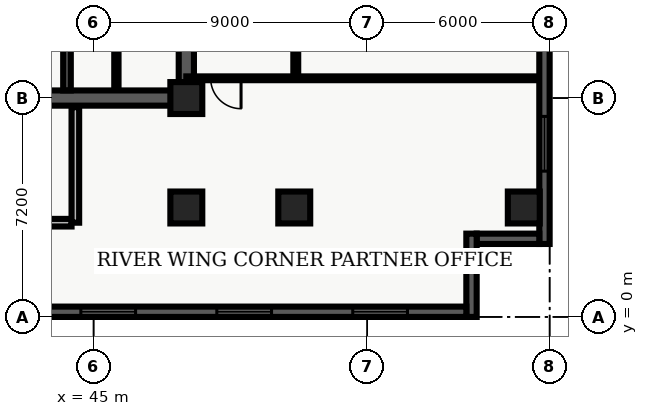
"""IFC4 building model, lengths in metres.
Left out: names, types, materials, properties, quantities, classifications, styles, units other than length and angle.
Written with IfcOpenShell. Run it as: python <this file> out.ifc"""

import sys

from ifc_helpers import new_model, entity, si_unit, converted_unit, direction, frame, origin_with_axes, origin_2d_with_axis, place, context, subcontext, project, spatial, polyline, rectangle, outline, extrude, element, fill, save


model = new_model("IFC4")
c1 = context("Model", 3, precision=1e-05, world=origin_with_axes(), true_north=direction((0.0, 1.0)))
c2 = subcontext(c1, "Body", "Model", "MODEL_VIEW")
j1 = project(units=[si_unit("LENGTHUNIT", "METRE"), converted_unit("PLANEANGLEUNIT", "DEGREE", entity("IfcPlaneAngleMeasure", 0.017), si_unit("PLANEANGLEUNIT", "RADIAN"), dimensions=[0, 0, 0, 0, 0, 0, 0])], contexts=[c1])
p1 = place(None, origin_with_axes())
s1 = spatial("IfcSite", under=j1, at=p1, CompositionType="ELEMENT")
p2 = place(p1, origin_with_axes())
s2 = spatial("IfcBuilding", under=s1, at=p2, CompositionType="ELEMENT")
p3 = place(p2, frame((0.0, 0.0, 156.3), z_axis=(0.0, 0.0, 1.0), x_axis=(1.0, 0.0, 0.0)))
s3 = spatial("IfcBuildingStorey", under=s2, at=p3, CompositionType="ELEMENT", Elevation=156.3)
p4 = place(p3, frame((40.2, 7.2, 0.0), z_axis=(0.0, 0.0, 1.0), x_axis=(1.0, 0.0, 0.0)))
e1 = element("IfcWall", 1, at=p4, inside=s3, PredefinedType="SHEAR", context=c2, shape_type="SweptSolid", body=[
    extrude(outline(polyline([(0.0, -0.25), (7.85, -0.25), (7.85, 0.25), (0.0, 0.25), (0.0, -0.25)])), origin_with_axes(), (0.0, 0.0, 1.0), 3.66),
])
p5 = place(p4, frame((2.175, 0.0, 0.0), z_axis=(0.0, 0.0, 1.0), x_axis=(1.0, 0.0, 0.0)))
e2 = element("IfcOpeningElement", 2, at=p5, cuts=e1, PredefinedType="OPENING", context=c2, shape_type="SweptSolid", body=[
    extrude(rectangle(XDim=1.05, YDim=0.52, at=origin_2d_with_axis()), origin_with_axes(), (0.0, 0.0, 1.0), 2.15),
])
p6 = place(p3, frame((48.05, 7.2, 0.0), z_axis=(0.0, 0.0, 1.0), x_axis=(0.0, 1.0, 0.0)))
e3 = element("IfcWall", 3, at=p6, inside=s3, PredefinedType="SHEAR", context=c2, shape_type="SweptSolid", body=[
    extrude(outline(polyline([(0.0, -0.25), (15.6, -0.25), (15.6, 0.25), (0.0, 0.25), (0.0, -0.25)])), origin_with_axes(), (0.0, 0.0, 1.0), 3.66),
])
p7 = place(p6, frame((5.975, 0.0, 0.0), z_axis=(0.0, 0.0, 1.0), x_axis=(1.0, 0.0, 0.0)))
e4 = element("IfcOpeningElement", 4, at=p7, cuts=e3, PredefinedType="OPENING", context=c2, shape_type="SweptSolid", body=[
    extrude(rectangle(XDim=1.05, YDim=0.52, at=origin_2d_with_axis()), origin_with_axes(), (0.0, 0.0, 1.0), 2.15),
])
p8 = place(p6, frame((2.725, 0.0, 0.0), z_axis=(0.0, 0.0, 1.0), x_axis=(1.0, 0.0, 0.0)))
e5 = element("IfcOpeningElement", 5, at=p8, cuts=e3, PredefinedType="OPENING", context=c2, shape_type="SweptSolid", body=[
    extrude(rectangle(XDim=0.95, YDim=0.52, at=origin_2d_with_axis()), origin_with_axes(), (0.0, 0.0, 1.0), 2.15),
])
p9 = place(p3, frame((44.125, 7.45, 0.0), z_axis=(0.0, 0.0, 1.0), x_axis=(0.0, 1.0, 0.0)))
e6 = element("IfcWall", 6, at=p9, inside=s3, PredefinedType="SHEAR", context=c2, shape_type="SweptSolid", body=[
    extrude(outline(polyline([(0.0, -0.125), (15.1, -0.125), (15.1, 0.125), (0.0, 0.125), (0.0, -0.125)])), origin_with_axes(), (0.0, 0.0, 1.0), 3.66),
])
p10 = place(p3, frame((40.325, 3.1, 0.0), z_axis=(0.0, 0.0, 1.0), x_axis=(1.0, 0.0, 0.0)))
e7 = element("IfcWall", 7, at=p10, inside=s3, PredefinedType="SOLIDWALL", context=c2, shape_type="SweptSolid", body=[
    extrude(outline(polyline([(0.0, -0.125), (3.95, -0.125), (3.95, 0.125), (0.0, 0.125), (0.0, -0.125)])), origin_with_axes(), (0.0, 0.0, 1.0), 2.7),
])
p11 = place(p3, frame((44.4, 3.1, 0.0), z_axis=(0.0, 0.0, 1.0), x_axis=(0.0, 1.0, 0.0)))
e8 = element("IfcWall", 8, at=p11, inside=s3, PredefinedType="SOLIDWALL", context=c2, shape_type="SweptSolid", body=[
    extrude(outline(polyline([(0.0, -0.125), (3.8, -0.125), (3.8, 0.125), (0.0, 0.125), (0.0, -0.125)])), origin_with_axes(), (0.0, 0.0, 1.0), 2.7),
])
for number, where, z_axis, x_axis in (
    (9, (48.05, 3.6, 0.0), (0.0, 0.0, 1.0), (1.0, 0.0, 0.0)),
    (10, (48.05, 7.2, 0.0), (0.0, 0.0, 1.0), (1.0, 0.0, 0.0)),
    (11, (51.6, 3.6, 0.0), (0.0, 0.0, 1.0), (1.0, 0.0, 0.0)),
    (12, (59.15, 3.6, 0.0), (0.0, 0.0, 1.0), (1.0, 0.0, 0.0)),
):
    element("IfcColumn", number, at=place(p3, frame(where, z_axis=z_axis, x_axis=x_axis)), inside=s3, PredefinedType="COLUMN", context=c2, shape_type="SweptSolid", body=[
        extrude(rectangle(XDim=1.05, YDim=1.05, at=origin_2d_with_axis()), origin_with_axes(), (0.0, 0.0, 1.0), 3.9),
    ])
p12 = place(p3, frame((45.75, 7.5, 0.0), z_axis=(0.0, 0.0, 1.0), x_axis=(0.0, 1.0, 0.0)))
e13 = element("IfcWall", 13, at=p12, inside=s3, PredefinedType="PARTITIONING", context=c2, shape_type="SweptSolid", body=[
    extrude(outline(polyline([(0.0, -0.07), (4.08, -0.07), (4.08, 0.07), (0.0, 0.07), (0.0, -0.07)])), origin_with_axes(), (0.0, 0.0, 1.0), 2.7),
])
p13 = place(p12, frame((2.0, 0.0, 0.0), z_axis=(0.0, 0.0, 1.0), x_axis=(1.0, 0.0, 0.0)))
e14 = element("IfcOpeningElement", 14, at=p13, cuts=e13, PredefinedType="OPENING", context=c2, shape_type="SweptSolid", body=[
    extrude(rectangle(XDim=0.9, YDim=0.16, at=origin_2d_with_axis()), origin_with_axes(), (0.0, 0.0, 1.0), 2.15),
])
p14 = place(p3, frame((51.65, 7.85, 0.0), z_axis=(0.0, 0.0, 1.0), x_axis=(0.0, 1.0, 0.0)))
e15 = element("IfcWall", 15, at=p14, inside=s3, PredefinedType="PARTITIONING", context=c2, shape_type="SweptSolid", body=[
    extrude(outline(polyline([(0.0, -0.08), (18.8, -0.08), (18.8, 0.08), (0.0, 0.08), (0.0, -0.08)])), origin_with_axes(), (0.0, 0.0, 1.0), 2.7),
])
p15 = place(p14, frame((4.559, 0.0, 0.0), z_axis=(0.0, 0.0, 1.0), x_axis=(1.0, 0.0, 0.0)))
e16 = element("IfcOpeningElement", 16, at=p15, cuts=e15, PredefinedType="OPENING", context=c2, shape_type="SweptSolid", body=[
    extrude(rectangle(XDim=1.0, YDim=0.18, at=origin_2d_with_axis()), origin_with_axes(), (0.0, 0.0, 1.0), 2.15),
])
p16 = place(p14, frame((11.523, 0.0, 0.0), z_axis=(0.0, 0.0, 1.0), x_axis=(1.0, 0.0, 0.0)))
e17 = element("IfcOpeningElement", 17, at=p16, cuts=e15, PredefinedType="OPENING", context=c2, shape_type="SweptSolid", body=[
    extrude(rectangle(XDim=1.0, YDim=0.18, at=origin_2d_with_axis()), origin_with_axes(), (0.0, 0.0, 1.0), 2.15),
])
p17 = place(p14, frame((17.733, 0.0, 0.0), z_axis=(0.0, 0.0, 1.0), x_axis=(1.0, 0.0, 0.0)))
e18 = element("IfcOpeningElement", 18, at=p17, cuts=e15, PredefinedType="OPENING", context=c2, shape_type="SweptSolid", body=[
    extrude(rectangle(XDim=1.0, YDim=0.18, at=origin_2d_with_axis()), origin_with_axes(), (0.0, 0.0, 1.0), 2.15),
])
p18 = place(p3, frame((59.665, 7.85, 0.0), z_axis=(0.0, 0.0, 1.0), x_axis=(-1.0, 0.0, 0.0)))
e19 = element("IfcWall", 19, at=p18, inside=s3, PredefinedType="PARTITIONING", context=c2, shape_type="SweptSolid", body=[
    extrude(outline(polyline([(0.0, -0.062), (11.615, -0.062), (11.615, 0.062), (0.0, 0.062), (0.0, -0.062)])), origin_with_axes(), (0.0, 0.0, 1.0), 2.7),
])
p19 = place(p18, frame((10.315, 0.0, 0.0), z_axis=(0.0, 0.0, 1.0), x_axis=(1.0, 0.0, 0.0)))
e20 = element("IfcOpeningElement", 20, at=p19, cuts=e19, PredefinedType="OPENING", context=c2, shape_type="SweptSolid", body=[
    extrude(rectangle(XDim=1.0, YDim=0.145, at=origin_2d_with_axis()), origin_with_axes(), (0.0, 0.0, 1.0), 2.15),
])
p20 = place(p3, frame((59.83, 26.06, 0.0), z_axis=(0.0, 0.0, 1.0), x_axis=(0.0, -1.0, 0.0)))
e21 = element("IfcWall", 21, at=p20, inside=s3, PredefinedType="SOLIDWALL", context=c2, shape_type="SweptSolid", body=[
    extrude(outline(polyline([(0.0, -0.17), (23.66, -0.17), (23.66, 0.17), (0.0, 0.17), (0.0, -0.17)])), origin_with_axes(), (0.0, 0.0, 1.0), 3.66),
])
p21 = place(p20, frame((11.83, 0.0, 0.45), z_axis=(0.0, 0.0, 1.0), x_axis=(1.0, 0.0, 0.0)))
e22 = element("IfcOpeningElement", 22, at=p21, cuts=e21, PredefinedType="OPENING", context=c2, shape_type="SweptSolid", body=[
    extrude(rectangle(XDim=1.8, YDim=0.36, at=origin_2d_with_axis()), origin_with_axes(), (0.0, 0.0, 1.0), 2.1),
])
p22 = place(p20, frame((20.364, 0.0, 0.45), z_axis=(0.0, 0.0, 1.0), x_axis=(1.0, 0.0, 0.0)))
e23 = element("IfcOpeningElement", 23, at=p22, cuts=e21, PredefinedType="OPENING", context=c2, shape_type="SweptSolid", body=[
    extrude(rectangle(XDim=1.8, YDim=0.36, at=origin_2d_with_axis()), origin_with_axes(), (0.0, 0.0, 1.0), 2.1),
])
p23 = place(p3, frame((59.66, 2.57, 0.0), z_axis=(0.0, 0.0, 1.0), x_axis=(-1.0, 0.0, 0.0)))
e24 = element("IfcWall", 24, at=p23, inside=s3, PredefinedType="SOLIDWALL", context=c2, shape_type="SweptSolid", body=[
    extrude(outline(polyline([(0.0, -0.17), (2.06, -0.17), (2.06, 0.17), (0.0, 0.17), (0.0, -0.17)])), origin_with_axes(), (0.0, 0.0, 1.0), 3.66),
])
p24 = place(p3, frame((57.43, 2.74, 0.0), z_axis=(0.0, 0.0, 1.0), x_axis=(0.0, -1.0, 0.0)))
e25 = element("IfcWall", 25, at=p24, inside=s3, PredefinedType="SOLIDWALL", context=c2, shape_type="SweptSolid", body=[
    extrude(outline(polyline([(0.0, -0.17), (2.74, -0.17), (2.74, 0.17), (0.0, 0.17), (0.0, -0.17)])), origin_with_axes(), (0.0, 0.0, 1.0), 3.66),
])
p25 = place(p3, frame((57.26, 0.17, 0.0), z_axis=(0.0, 0.0, 1.0), x_axis=(-1.0, 0.0, 0.0)))
e26 = element("IfcWall", 26, at=p25, inside=s3, PredefinedType="SOLIDWALL", context=c2, shape_type="SweptSolid", body=[
    extrude(outline(polyline([(0.0, -0.17), (54.86, -0.17), (54.86, 0.17), (0.0, 0.17), (0.0, -0.17)])), origin_with_axes(), (0.0, 0.0, 1.0), 3.66),
])
p26 = place(p25, frame((2.836, 0.0, 0.45), z_axis=(0.0, 0.0, 1.0), x_axis=(1.0, 0.0, 0.0)))
e27 = element("IfcOpeningElement", 27, at=p26, cuts=e26, PredefinedType="OPENING", context=c2, shape_type="SweptSolid", body=[
    extrude(rectangle(XDim=1.8, YDim=0.36, at=origin_2d_with_axis()), origin_with_axes(), (0.0, 0.0, 1.0), 2.1),
])
p27 = place(p25, frame((7.307, 0.0, 0.45), z_axis=(0.0, 0.0, 1.0), x_axis=(1.0, 0.0, 0.0)))
e28 = element("IfcOpeningElement", 28, at=p27, cuts=e26, PredefinedType="OPENING", context=c2, shape_type="SweptSolid", body=[
    extrude(rectangle(XDim=1.8, YDim=0.36, at=origin_2d_with_axis()), origin_with_axes(), (0.0, 0.0, 1.0), 2.1),
])
p28 = place(p25, frame((11.779, 0.0, 0.45), z_axis=(0.0, 0.0, 1.0), x_axis=(1.0, 0.0, 0.0)))
e29 = element("IfcOpeningElement", 29, at=p28, cuts=e26, PredefinedType="OPENING", context=c2, shape_type="SweptSolid", body=[
    extrude(rectangle(XDim=1.8, YDim=0.36, at=origin_2d_with_axis()), origin_with_axes(), (0.0, 0.0, 1.0), 2.1),
])
p29 = place(p25, frame((16.251, 0.0, 0.45), z_axis=(0.0, 0.0, 1.0), x_axis=(1.0, 0.0, 0.0)))
e30 = element("IfcOpeningElement", 30, at=p29, cuts=e26, PredefinedType="OPENING", context=c2, shape_type="SweptSolid", body=[
    extrude(rectangle(XDim=1.8, YDim=0.36, at=origin_2d_with_axis()), origin_with_axes(), (0.0, 0.0, 1.0), 2.1),
])
p30 = place(p25, frame((20.723, 0.0, 0.45), z_axis=(0.0, 0.0, 1.0), x_axis=(1.0, 0.0, 0.0)))
e31 = element("IfcOpeningElement", 31, at=p30, cuts=e26, PredefinedType="OPENING", context=c2, shape_type="SweptSolid", body=[
    extrude(rectangle(XDim=1.8, YDim=0.36, at=origin_2d_with_axis()), origin_with_axes(), (0.0, 0.0, 1.0), 2.1),
])
p31 = place(p25, frame((25.194, 0.0, 0.45), z_axis=(0.0, 0.0, 1.0), x_axis=(1.0, 0.0, 0.0)))
e32 = element("IfcOpeningElement", 32, at=p31, cuts=e26, PredefinedType="OPENING", context=c2, shape_type="SweptSolid", body=[
    extrude(rectangle(XDim=1.8, YDim=0.36, at=origin_2d_with_axis()), origin_with_axes(), (0.0, 0.0, 1.0), 2.1),
])
p32 = place(p25, frame((29.666, 0.0, 0.45), z_axis=(0.0, 0.0, 1.0), x_axis=(1.0, 0.0, 0.0)))
e33 = element("IfcOpeningElement", 33, at=p32, cuts=e26, PredefinedType="OPENING", context=c2, shape_type="SweptSolid", body=[
    extrude(rectangle(XDim=1.8, YDim=0.36, at=origin_2d_with_axis()), origin_with_axes(), (0.0, 0.0, 1.0), 2.1),
])
p33 = place(p25, frame((34.138, 0.0, 0.45), z_axis=(0.0, 0.0, 1.0), x_axis=(1.0, 0.0, 0.0)))
e34 = element("IfcOpeningElement", 34, at=p33, cuts=e26, PredefinedType="OPENING", context=c2, shape_type="SweptSolid", body=[
    extrude(rectangle(XDim=1.8, YDim=0.36, at=origin_2d_with_axis()), origin_with_axes(), (0.0, 0.0, 1.0), 2.1),
])
p34 = place(p25, frame((38.609, 0.0, 0.45), z_axis=(0.0, 0.0, 1.0), x_axis=(1.0, 0.0, 0.0)))
e35 = element("IfcOpeningElement", 35, at=p34, cuts=e26, PredefinedType="OPENING", context=c2, shape_type="SweptSolid", body=[
    extrude(rectangle(XDim=1.8, YDim=0.36, at=origin_2d_with_axis()), origin_with_axes(), (0.0, 0.0, 1.0), 2.1),
])
p35 = place(p25, frame((43.081, 0.0, 0.45), z_axis=(0.0, 0.0, 1.0), x_axis=(1.0, 0.0, 0.0)))
e36 = element("IfcOpeningElement", 36, at=p35, cuts=e26, PredefinedType="OPENING", context=c2, shape_type="SweptSolid", body=[
    extrude(rectangle(XDim=1.8, YDim=0.36, at=origin_2d_with_axis()), origin_with_axes(), (0.0, 0.0, 1.0), 2.1),
])
p36 = place(p25, frame((48.403, 0.0, 0.45), z_axis=(0.0, 0.0, 1.0), x_axis=(1.0, 0.0, 0.0)))
e37 = element("IfcOpeningElement", 37, at=p36, cuts=e26, PredefinedType="OPENING", context=c2, shape_type="SweptSolid", body=[
    extrude(rectangle(XDim=1.8, YDim=0.36, at=origin_2d_with_axis()), origin_with_axes(), (0.0, 0.0, 1.0), 2.1),
])
p37 = place(p25, frame((52.024, 0.0, 0.45), z_axis=(0.0, 0.0, 1.0), x_axis=(1.0, 0.0, 0.0)))
e38 = element("IfcOpeningElement", 38, at=p37, cuts=e26, PredefinedType="OPENING", context=c2, shape_type="SweptSolid", body=[
    extrude(rectangle(XDim=1.8, YDim=0.36, at=origin_2d_with_axis()), origin_with_axes(), (0.0, 0.0, 1.0), 2.1),
])
p38 = place(p18, frame((10.315, 0.0, 0.0), z_axis=(0.0, 0.0, 1.0), x_axis=(1.0, 0.0, 0.0)))
e39 = element("IfcDoor", 39, at=p38, inside=s3, OperationType="SINGLE_SWING_LEFT", PredefinedType="DOOR", context=c2, shape_type="SweptSolid", body=[
    extrude(rectangle(XDim=1.0, YDim=0.075, at=origin_2d_with_axis()), origin_with_axes(), (0.0, 0.0, 1.0), 2.15),
])
fill(e20, e39)
p39 = place(p20, frame((20.364, 0.0, 0.45), z_axis=(0.0, 0.0, 1.0), x_axis=(1.0, 0.0, 0.0)))
e40 = element("IfcWindow", 40, at=p39, inside=s3, PredefinedType="WINDOW", context=c2, shape_type="SweptSolid", body=[
    extrude(rectangle(XDim=1.8, YDim=0.09, at=origin_2d_with_axis()), origin_with_axes(), (0.0, 0.0, 1.0), 2.1),
])
fill(e23, e40)
p40 = place(p25, frame((2.836, 0.0, 0.45), z_axis=(0.0, 0.0, 1.0), x_axis=(1.0, 0.0, 0.0)))
e41 = element("IfcWindow", 41, at=p40, inside=s3, PredefinedType="WINDOW", context=c2, shape_type="SweptSolid", body=[
    extrude(rectangle(XDim=1.8, YDim=0.09, at=origin_2d_with_axis()), origin_with_axes(), (0.0, 0.0, 1.0), 2.1),
])
fill(e27, e41)
p41 = place(p25, frame((7.307, 0.0, 0.45), z_axis=(0.0, 0.0, 1.0), x_axis=(1.0, 0.0, 0.0)))
e42 = element("IfcWindow", 42, at=p41, inside=s3, PredefinedType="WINDOW", context=c2, shape_type="SweptSolid", body=[
    extrude(rectangle(XDim=1.8, YDim=0.09, at=origin_2d_with_axis()), origin_with_axes(), (0.0, 0.0, 1.0), 2.1),
])
fill(e28, e42)
p42 = place(p25, frame((11.779, 0.0, 0.45), z_axis=(0.0, 0.0, 1.0), x_axis=(1.0, 0.0, 0.0)))
e43 = element("IfcWindow", 43, at=p42, inside=s3, PredefinedType="WINDOW", context=c2, shape_type="SweptSolid", body=[
    extrude(rectangle(XDim=1.8, YDim=0.09, at=origin_2d_with_axis()), origin_with_axes(), (0.0, 0.0, 1.0), 2.1),
])
fill(e29, e43)
save(model, sys.argv[1])
